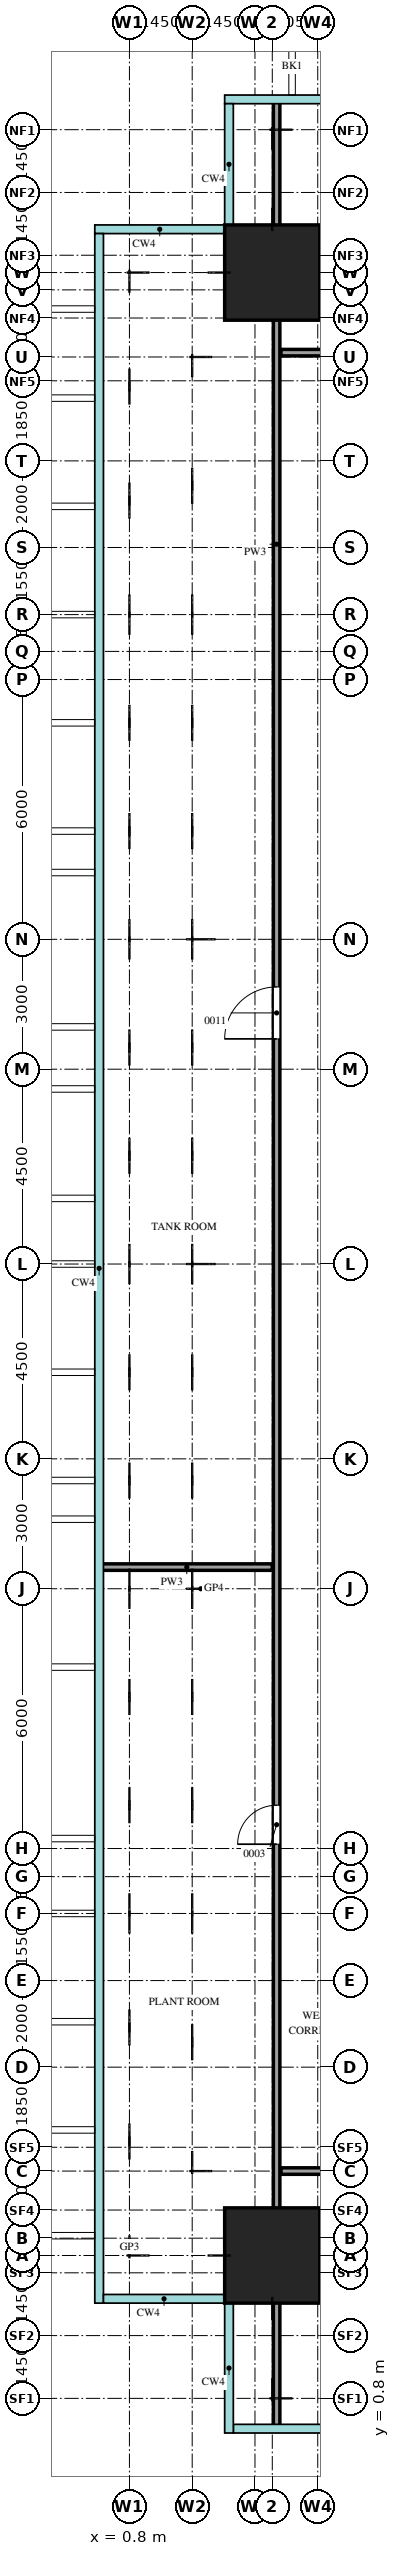
"""IFC4 building model, lengths in metres.
Left out: names, types, materials, properties, quantities, classifications, styles, units other than length and angle.
Written with IfcOpenShell. Run it as: python <this file> out.ifc"""

import sys

from ifc_helpers import new_model, si_unit, direction, frame, frame_2d, origin, origin_2d, place, context, subcontext, project, spatial, rectangle, extrude, source, transform, mapped, element, fill, save


model = new_model("IFC4")
c1 = context("Model", 3, precision=1e-05, world=origin(), true_north=direction((0.0, 1.0)))
c2 = subcontext(c1, "Body", "Model", "MODEL_VIEW")
j1 = project(units=[si_unit("LENGTHUNIT", "METRE"), si_unit("PLANEANGLEUNIT", "RADIAN")], contexts=[c1])
p1 = place(None, origin())
s1 = spatial("IfcSite", under=j1, at=p1, CompositionType="ELEMENT")
p2 = place(p1, origin())
s2 = spatial("IfcBuilding", under=s1, at=p2, CompositionType="ELEMENT")
p3 = place(p2, frame((0.0, 0.0, 96.0)))
s3 = spatial("IfcBuildingStorey", under=s2, at=p3, CompositionType="ELEMENT", Elevation=96.0)
m1 = source(origin(), c2, "Body", "SweptSolid", [
    extrude(rectangle(XDim=2.2, YDim=2.2, at=origin_2d()), origin(), (0.0, 0.0, 1.0), 5.5),
])
for number, where, z_axis, x_axis in (
    (1, (4.1, 49.9, 0.0), (0.0, 0.0, 1.0), (1.0, 0.0, 0.0)),
    (2, (4.1, 4.1, 0.0), (0.0, 0.0, 1.0), (1.0, 0.0, 0.0)),
):
    element("IfcColumn", number, at=place(p3, frame(where, z_axis=z_axis, x_axis=x_axis)), inside=s3, PredefinedType="COLUMN", context=c2, shape_type="MappedRepresentation", body=[
        mapped(m1, transform((0.0, 0.0, 0.0))),
    ])
m2 = source(origin(), c2, "Body", "SweptSolid", [
    extrude(rectangle(XDim=53.7, YDim=0.15, at=frame_2d((26.85, 0.0))), origin(), (0.0, 0.0, 1.0), 5.2),
])
p4 = place(p3, frame((4.2, 0.15, 0.0), z_axis=(0.0, 0.0, 1.0), x_axis=(0.0, 1.0, 0.0)))
e3 = element("IfcWall", 3, at=p4, inside=s3, PredefinedType="PARTITIONING", context=c2, shape_type="MappedRepresentation", body=[
    mapped(m2, transform((0.0, 0.0, 0.0))),
])
m3 = source(origin(), c2, "Body", "SweptSolid", [
    extrude(rectangle(XDim=0.9, YDim=2.1, at=frame_2d((0.45, 1.05))), frame((0.0, 0.085, 0.0), z_axis=(0.0, -1.0, 0.0), x_axis=(1.0, 0.0, 0.0)), (0.0, 0.0, 1.0), 0.17),
])
p5 = place(p4, frame((13.45, 0.0, 0.0)))
e4 = element("IfcOpeningElement", 4, at=p5, cuts=e3, PredefinedType="OPENING", context=c2, shape_type="MappedRepresentation", body=[
    mapped(m3, transform((0.0, 0.0, 0.0))),
])
m4 = source(origin(), c2, "Body", "SweptSolid", [
    extrude(rectangle(XDim=1.2, YDim=2.1, at=frame_2d((0.6, 1.05))), frame((0.0, 0.085, 0.0), z_axis=(0.0, -1.0, 0.0), x_axis=(1.0, 0.0, 0.0)), (0.0, 0.0, 1.0), 0.17),
])
p6 = place(p4, frame((32.05, 0.0, 0.0)))
e5 = element("IfcOpeningElement", 5, at=p6, cuts=e3, PredefinedType="OPENING", context=c2, shape_type="MappedRepresentation", body=[
    mapped(m4, transform((0.0, 0.0, 0.0))),
])
m5 = source(origin(), c2, "Body", "SweptSolid", [
    extrude(rectangle(XDim=22.0, YDim=0.15, at=frame_2d((11.0, 0.0))), origin(), (0.0, 0.0, 1.0), 5.2),
])
p7 = place(p3, frame((4.3, 6.05, 0.0), z_axis=(0.0, 0.0, 1.0), x_axis=(1.0, 0.0, 0.0)))
e6 = element("IfcWall", 6, at=p7, inside=s3, PredefinedType="PARTITIONING", context=c2, shape_type="MappedRepresentation", body=[
    mapped(m5, transform((0.0, 0.0, 0.0))),
])
p8 = place(p7, frame((9.05, 0.0, 0.0)))
e7 = element("IfcOpeningElement", 7, at=p8, cuts=e6, PredefinedType="OPENING", context=c2, shape_type="MappedRepresentation", body=[
    mapped(m4, transform((0.0, 0.0, 0.0))),
])
m6 = source(origin(), c2, "Body", "SweptSolid", [
    extrude(rectangle(XDim=3.95, YDim=0.15, at=frame_2d((1.975, 0.0))), origin(), (0.0, 0.0, 1.0), 5.2),
])
p9 = place(p3, frame((0.15, 20.0, 0.0), z_axis=(0.0, 0.0, 1.0), x_axis=(1.0, 0.0, 0.0)))
e8 = element("IfcWall", 8, at=p9, inside=s3, PredefinedType="PARTITIONING", context=c2, shape_type="MappedRepresentation", body=[
    mapped(m6, transform((0.0, 0.0, 0.0))),
])
m7 = source(origin(), c2, "Body", "SweptSolid", [
    extrude(rectangle(XDim=26.45, YDim=0.15, at=frame_2d((13.225, 0.0))), origin(), (0.0, 0.0, 1.0), 5.2),
])
p10 = place(p3, frame((4.3, 48.05, 0.0), z_axis=(0.0, 0.0, 1.0), x_axis=(1.0, 0.0, 0.0)))
e9 = element("IfcWall", 9, at=p10, inside=s3, PredefinedType="PARTITIONING", context=c2, shape_type="MappedRepresentation", body=[
    mapped(m7, transform((0.0, 0.0, 0.0))),
])
p11 = place(p10, frame((3.35, 0.0, 0.0)))
e10 = element("IfcOpeningElement", 10, at=p11, cuts=e9, PredefinedType="OPENING", context=c2, shape_type="MappedRepresentation", body=[
    mapped(m3, transform((0.0, 0.0, 0.0))),
])
p12 = place(p10, frame((10.85, 0.0, 0.0)))
e11 = element("IfcOpeningElement", 11, at=p12, cuts=e9, PredefinedType="OPENING", context=c2, shape_type="MappedRepresentation", body=[
    mapped(m3, transform((0.0, 0.0, 0.0))),
])
p13 = place(p10, frame((20.35, 0.0, 0.0)))
e12 = element("IfcOpeningElement", 12, at=p13, cuts=e9, PredefinedType="OPENING", context=c2, shape_type="MappedRepresentation", body=[
    mapped(m3, transform((0.0, 0.0, 0.0))),
])
m8 = source(origin(), c2, "Body", "SweptSolid", [
    extrude(rectangle(XDim=0.9, YDim=2.1, at=frame_2d((0.45, 1.05))), frame((0.0, 0.025, 0.0), z_axis=(0.0, -1.0, 0.0), x_axis=(1.0, 0.0, 0.0)), (0.0, 0.0, 1.0), 0.05),
])
p14 = place(p5, origin())
e13 = element("IfcDoor", 13, at=p14, inside=s3, OperationType="SINGLE_SWING_RIGHT", PredefinedType="DOOR", context=c2, shape_type="MappedRepresentation", body=[
    mapped(m8, transform((0.0, 0.0, 0.0))),
])
fill(e4, e13)
m9 = source(origin(), c2, "Body", "SweptSolid", [
    extrude(rectangle(XDim=1.2, YDim=2.1, at=frame_2d((0.6, 1.05))), frame((0.0, 0.025, 0.0), z_axis=(0.0, -1.0, 0.0), x_axis=(1.0, 0.0, 0.0)), (0.0, 0.0, 1.0), 0.05),
])
p15 = place(p6, origin())
e14 = element("IfcDoor", 14, at=p15, inside=s3, OperationType="SINGLE_SWING_RIGHT", PredefinedType="DOOR", context=c2, shape_type="MappedRepresentation", body=[
    mapped(m9, transform((0.0, 0.0, 0.0))),
])
fill(e5, e14)
save(model, sys.argv[1])
